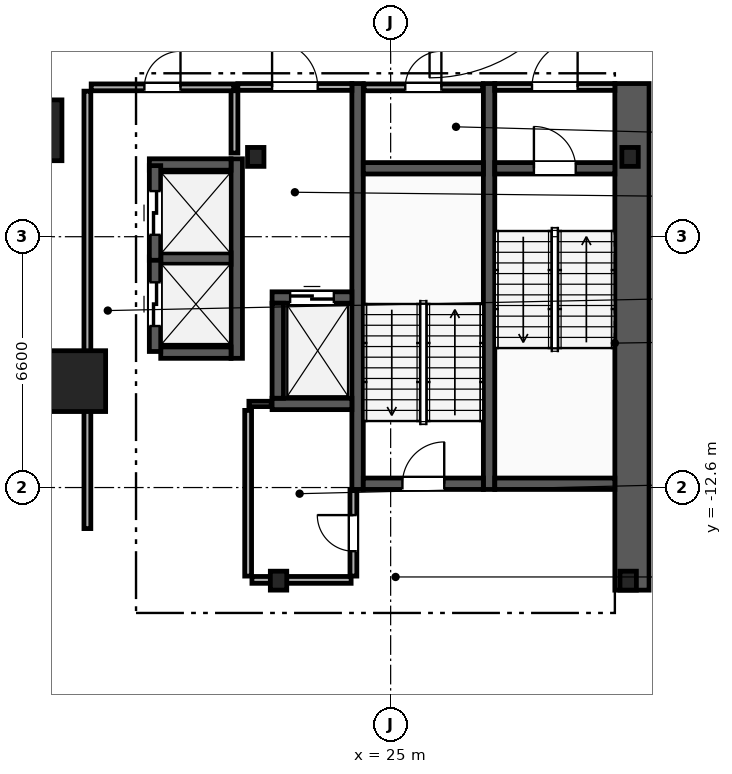
"""IFC4 building model, lengths in metres.
Left out: names, types, materials, properties, quantities, classifications, styles, units other than length and angle.
Written with IfcOpenShell. Run it as: python <this file> out.ifc"""

import sys

from ifc_helpers import new_model, si_unit, direction, frame, frame_2d, origin, origin_2d, place, context, subcontext, project, spatial, rectangle, i_section, extrude, element, fill, save


model = new_model("IFC4")
c1 = context("Model", 3, precision=1e-05, world=origin(), true_north=direction((0.0, 1.0)))
c2 = subcontext(c1, "Body", "Model", "MODEL_VIEW")
j1 = project(units=[si_unit("LENGTHUNIT", "METRE"), si_unit("PLANEANGLEUNIT", "RADIAN")], contexts=[c1])
p1 = place(None, origin())
s1 = spatial("IfcSite", under=j1, at=p1, CompositionType="ELEMENT")
p2 = place(p1, origin())
s2 = spatial("IfcBuilding", under=s1, at=p2, CompositionType="ELEMENT")
p3 = place(p2, frame((0.0, 0.0, -9.0)))
s3 = spatial("IfcBuildingStorey", under=s2, at=p3, CompositionType="ELEMENT", Elevation=-9.0)
for number, where, z_axis, x_axis in (
    (1, (31.3, -3.9, 0.0), (0.0, 0.0, 1.0), (1.0, 0.0, 0.0)),
    (2, (21.45, -3.9, 0.0), (0.0, 0.0, 1.0), (1.0, 0.0, 0.0)),
    (3, (22.05, -15.05, 0.0), (0.0, 0.0, 1.0), (1.0, 0.0, 0.0)),
    (4, (31.25, -15.05, 0.0), (0.0, 0.0, 1.0), (1.0, 0.0, 0.0)),
):
    element("IfcColumn", number, at=place(p3, frame(where, z_axis=z_axis, x_axis=x_axis)), inside=s3, PredefinedType="COLUMN", context=c2, shape_type="SweptSolid", body=[
        extrude(i_section(OverallWidth=0.432, OverallDepth=0.498, WebThickness=0.056, FlangeThickness=0.089, FilletRadius=0.018, at=origin_2d()), origin(), (0.0, 0.0, 1.0), 4.5),
    ])
for number, where, z_axis, x_axis in (
    (5, (15.55, -3.2, 0.0), (0.0, 0.0, 1.0), (1.0, 0.0, 0.0)),
    (6, (16.7, -9.8, 0.0), (0.0, 0.0, 1.0), (1.0, 0.0, 0.0)),
):
    element("IfcColumn", number, at=place(p3, frame(where, z_axis=z_axis, x_axis=x_axis)), inside=s3, PredefinedType="COLUMN", context=c2, shape_type="SweptSolid", body=[
        extrude(rectangle(XDim=1.6, YDim=1.6, at=origin_2d()), origin(), (0.0, 0.0, 1.0), 4.5),
    ])
p4 = place(p3, frame((31.35, -15.3, 0.0), z_axis=(0.0, 0.0, 1.0), x_axis=(0.0, 1.0, 0.0)))
e7 = element("IfcWall", 7, at=p4, inside=s3, PredefinedType="SHEAR", context=c2, shape_type="SweptSolid", body=[
    extrude(rectangle(XDim=13.33, YDim=0.9, at=frame_2d((6.665, 0.0))), origin(), (0.0, 0.0, 1.0), 4.15),
])
for number, where, z_axis, x_axis in (
    (8, (27.59, -12.65, 0.0), (0.0, 0.0, 1.0), (0.0, 1.0, 0.0)),
    (9, (24.13, -12.65, 0.0), (0.0, 0.0, 1.0), (0.0, 1.0, 0.0)),
):
    element("IfcWall", number, at=place(p3, frame(where, z_axis=z_axis, x_axis=x_axis)), inside=s3, PredefinedType="SHEAR", context=c2, shape_type="SweptSolid", body=[
        extrude(rectangle(XDim=10.68, YDim=0.3, at=frame_2d((5.34, 0.0))), origin(), (0.0, 0.0, 1.0), 4.15),
    ])
p5 = place(p3, frame((27.74, -4.2, 0.0), z_axis=(0.0, 0.0, 1.0), x_axis=(1.0, 0.0, 0.0)))
e10 = element("IfcWall", 10, at=p5, inside=s3, PredefinedType="SHEAR", context=c2, shape_type="SweptSolid", body=[
    extrude(rectangle(XDim=3.16, YDim=0.3, at=frame_2d((1.58, 0.0))), origin(), (0.0, 0.0, 1.0), 4.15),
])
p6 = place(p5, frame((1.03, 0.0, 0.0)))
e11 = element("IfcOpeningElement", 11, at=p6, cuts=e10, PredefinedType="OPENING", context=c2, shape_type="SweptSolid", body=[
    extrude(rectangle(XDim=1.1, YDim=2.15, at=frame_2d((0.55, 1.075))), frame((0.0, 0.16, 0.0), z_axis=(0.0, -1.0, 0.0), x_axis=(1.0, 0.0, 0.0)), (0.0, 0.0, 1.0), 0.32),
])
p7 = place(p3, frame((27.74, -12.5, 0.0), z_axis=(0.0, 0.0, 1.0), x_axis=(1.0, 0.0, 0.0)))
e12 = element("IfcWall", 12, at=p7, inside=s3, PredefinedType="SHEAR", context=c2, shape_type="SweptSolid", body=[
    extrude(rectangle(XDim=3.16, YDim=0.3, at=frame_2d((1.58, 0.0))), origin(), (0.0, 0.0, 1.0), 4.15),
])
p8 = place(p3, frame((24.28, -12.5, 0.0), z_axis=(0.0, 0.0, 1.0), x_axis=(1.0, 0.0, 0.0)))
e13 = element("IfcWall", 13, at=p8, inside=s3, PredefinedType="SHEAR", context=c2, shape_type="SweptSolid", body=[
    extrude(rectangle(XDim=3.16, YDim=0.3, at=frame_2d((1.58, 0.0))), origin(), (0.0, 0.0, 1.0), 4.15),
])
p9 = place(p8, frame((1.03, 0.0, 0.0)))
e14 = element("IfcOpeningElement", 14, at=p9, cuts=e13, PredefinedType="OPENING", context=c2, shape_type="SweptSolid", body=[
    extrude(rectangle(XDim=1.1, YDim=2.15, at=frame_2d((0.55, 1.075))), frame((0.0, 0.16, 0.0), z_axis=(0.0, -1.0, 0.0), x_axis=(1.0, 0.0, 0.0)), (0.0, 0.0, 1.0), 0.32),
])
p10 = place(p3, frame((24.28, -4.2, 0.0), z_axis=(0.0, 0.0, 1.0), x_axis=(1.0, 0.0, 0.0)))
e15 = element("IfcWall", 15, at=p10, inside=s3, PredefinedType="SHEAR", context=c2, shape_type="SweptSolid", body=[
    extrude(rectangle(XDim=3.16, YDim=0.3, at=frame_2d((1.58, 0.0))), origin(), (0.0, 0.0, 1.0), 4.15),
])
p11 = place(p3, frame((20.89, -3.8, 0.0), z_axis=(0.0, 0.0, 1.0), x_axis=(0.0, 1.0, 0.0)))
e16 = element("IfcWall", 16, at=p11, inside=s3, PredefinedType="PARTITIONING", context=c2, shape_type="SweptSolid", body=[
    extrude(rectangle(XDim=1.65, YDim=0.18, at=frame_2d((0.825, 0.0))), origin(), (0.0, 0.0, 1.0), 4.15),
])
p12 = place(p3, frame((20.98, -2.06, 0.0), z_axis=(0.0, 0.0, 1.0), x_axis=(1.0, 0.0, 0.0)))
e17 = element("IfcWall", 17, at=p12, inside=s3, PredefinedType="PARTITIONING", context=c2, shape_type="SweptSolid", body=[
    extrude(rectangle(XDim=3.0, YDim=0.18, at=frame_2d((1.5, 0.0))), origin(), (0.0, 0.0, 1.0), 4.15),
])
p13 = place(p12, frame((0.9, 0.0, 0.0)))
e18 = element("IfcOpeningElement", 18, at=p13, cuts=e17, PredefinedType="OPENING", context=c2, shape_type="SweptSolid", body=[
    extrude(rectangle(XDim=1.2, YDim=2.15, at=frame_2d((0.6, 1.075))), frame((0.0, 0.1, 0.0), z_axis=(0.0, -1.0, 0.0), x_axis=(1.0, 0.0, 0.0)), (0.0, 0.0, 1.0), 0.2),
])
p14 = place(p3, frame((27.74, -2.06, 0.0), z_axis=(0.0, 0.0, 1.0), x_axis=(1.0, 0.0, 0.0)))
e19 = element("IfcWall", 19, at=p14, inside=s3, PredefinedType="PARTITIONING", context=c2, shape_type="SweptSolid", body=[
    extrude(rectangle(XDim=3.16, YDim=0.18, at=frame_2d((1.58, 0.0))), origin(), (0.0, 0.0, 1.0), 4.15),
])
p15 = place(p14, frame((0.98, 0.0, 0.0)))
e20 = element("IfcOpeningElement", 20, at=p15, cuts=e19, PredefinedType="OPENING", context=c2, shape_type="SweptSolid", body=[
    extrude(rectangle(XDim=1.2, YDim=2.15, at=frame_2d((0.6, 1.075))), frame((0.0, 0.1, 0.0), z_axis=(0.0, -1.0, 0.0), x_axis=(1.0, 0.0, 0.0)), (0.0, 0.0, 1.0), 0.2),
])
p16 = place(p3, frame((21.88, -7.6, 0.0), z_axis=(0.0, 0.0, 1.0), x_axis=(1.0, 0.0, 0.0)))
e21 = element("IfcWall", 21, at=p16, inside=s3, PredefinedType="SHEAR", context=c2, shape_type="SweptSolid", body=[
    extrude(rectangle(XDim=2.1, YDim=0.3, at=frame_2d((1.05, 0.0))), origin(), (0.0, 0.0, 1.0), 4.15),
])
p17 = place(p16, frame((0.475, 0.0, 0.0)))
e22 = element("IfcOpeningElement", 22, at=p17, cuts=e21, PredefinedType="OPENING", context=c2, shape_type="SweptSolid", body=[
    extrude(rectangle(XDim=1.15, YDim=2.2, at=frame_2d((0.575, 1.1))), frame((0.0, 0.16, 0.0), z_axis=(0.0, -1.0, 0.0), x_axis=(1.0, 0.0, 0.0)), (0.0, 0.0, 1.0), 0.32),
])
p18 = place(p3, frame((21.88, -10.4, 0.0), z_axis=(0.0, 0.0, 1.0), x_axis=(1.0, 0.0, 0.0)))
e23 = element("IfcWall", 23, at=p18, inside=s3, PredefinedType="SHEAR", context=c2, shape_type="SweptSolid", body=[
    extrude(rectangle(XDim=2.1, YDim=0.3, at=frame_2d((1.05, 0.0))), origin(), (0.0, 0.0, 1.0), 4.15),
])
p19 = place(p3, frame((22.03, -10.25, 0.0), z_axis=(0.0, 0.0, 1.0), x_axis=(0.0, 1.0, 0.0)))
e24 = element("IfcWall", 24, at=p19, inside=s3, PredefinedType="SHEAR", context=c2, shape_type="SweptSolid", body=[
    extrude(rectangle(XDim=2.5, YDim=0.3, at=frame_2d((1.25, 0.0))), origin(), (0.0, 0.0, 1.0), 4.15),
])
p20 = place(p3, frame((20.95, -9.2, 0.0), z_axis=(0.0, 0.0, 1.0), x_axis=(0.0, 1.0, 0.0)))
e25 = element("IfcWall", 25, at=p20, inside=s3, PredefinedType="SHEAR", context=c2, shape_type="SweptSolid", body=[
    extrude(rectangle(XDim=5.25, YDim=0.3, at=frame_2d((2.625, 0.0))), origin(), (0.0, 0.0, 1.0), 4.15),
])
p21 = place(p3, frame((18.95, -9.05, 0.0), z_axis=(0.0, 0.0, 1.0), x_axis=(1.0, 0.0, 0.0)))
e26 = element("IfcWall", 26, at=p21, inside=s3, PredefinedType="SHEAR", context=c2, shape_type="SweptSolid", body=[
    extrude(rectangle(XDim=1.85, YDim=0.3, at=frame_2d((0.925, 0.0))), origin(), (0.0, 0.0, 1.0), 4.15),
])
p22 = place(p3, frame((18.65, -4.1, 0.0), z_axis=(0.0, 0.0, 1.0), x_axis=(1.0, 0.0, 0.0)))
e27 = element("IfcWall", 27, at=p22, inside=s3, PredefinedType="SHEAR", context=c2, shape_type="SweptSolid", body=[
    extrude(rectangle(XDim=2.15, YDim=0.3, at=frame_2d((1.075, 0.0))), origin(), (0.0, 0.0, 1.0), 4.15),
])
p23 = place(p3, frame((18.95, -6.575, 0.0), z_axis=(0.0, 0.0, 1.0), x_axis=(1.0, 0.0, 0.0)))
e28 = element("IfcWall", 28, at=p23, inside=s3, PredefinedType="SHEAR", context=c2, shape_type="SweptSolid", body=[
    extrude(rectangle(XDim=1.85, YDim=0.3, at=frame_2d((0.925, 0.0))), origin(), (0.0, 0.0, 1.0), 4.15),
])
p24 = place(p3, frame((18.8, -9.02, 0.0), z_axis=(0.0, 0.0, 1.0), x_axis=(0.0, 1.0, 0.0)))
e29 = element("IfcWall", 29, at=p24, inside=s3, PredefinedType="SHEAR", context=c2, shape_type="SweptSolid", body=[
    extrude(rectangle(XDim=2.49, YDim=0.3, at=frame_2d((1.245, 0.0))), origin(), (0.0, 0.0, 1.0), 4.15),
])
p25 = place(p24, frame((0.67, 0.0, 0.0)))
e30 = element("IfcOpeningElement", 30, at=p25, cuts=e29, PredefinedType="OPENING", context=c2, shape_type="SweptSolid", body=[
    extrude(rectangle(XDim=1.15, YDim=2.2, at=frame_2d((0.575, 1.1))), frame((0.0, 0.16, 0.0), z_axis=(0.0, -1.0, 0.0), x_axis=(1.0, 0.0, 0.0)), (0.0, 0.0, 1.0), 0.32),
])
p26 = place(p3, frame((18.8, -6.62, 0.0), z_axis=(0.0, 0.0, 1.0), x_axis=(0.0, 1.0, 0.0)))
e31 = element("IfcWall", 31, at=p26, inside=s3, PredefinedType="SHEAR", context=c2, shape_type="SweptSolid", body=[
    extrude(rectangle(XDim=2.49, YDim=0.3, at=frame_2d((1.245, 0.0))), origin(), (0.0, 0.0, 1.0), 4.15),
])
p27 = place(p26, frame((0.67, 0.0, 0.0)))
e32 = element("IfcOpeningElement", 32, at=p27, cuts=e31, PredefinedType="OPENING", context=c2, shape_type="SweptSolid", body=[
    extrude(rectangle(XDim=1.15, YDim=2.2, at=frame_2d((0.575, 1.1))), frame((0.0, 0.16, 0.0), z_axis=(0.0, -1.0, 0.0), x_axis=(1.0, 0.0, 0.0)), (0.0, 0.0, 1.0), 0.32),
])
p28 = place(p3, frame((17.02, -13.68, 0.0), z_axis=(0.0, 0.0, 1.0), x_axis=(0.0, 1.0, 0.0)))
e33 = element("IfcWall", 33, at=p28, inside=s3, PredefinedType="PARTITIONING", context=c2, shape_type="SweptSolid", body=[
    extrude(rectangle(XDim=11.51, YDim=0.18, at=frame_2d((5.755, 0.0))), origin(), (0.0, 0.0, 1.0), 4.15),
])
p29 = place(p3, frame((17.12, -2.07, 0.0), z_axis=(0.0, 0.0, 1.0), x_axis=(1.0, 0.0, 0.0)))
e34 = element("IfcWall", 34, at=p29, inside=s3, PredefinedType="PARTITIONING", context=c2, shape_type="SweptSolid", body=[
    extrude(rectangle(XDim=3.75, YDim=0.18, at=frame_2d((1.875, 0.0))), origin(), (0.0, 0.0, 1.0), 4.15),
])
p30 = place(p29, frame((1.4, 0.0, 0.0)))
e35 = element("IfcOpeningElement", 35, at=p30, cuts=e34, PredefinedType="OPENING", context=c2, shape_type="SweptSolid", body=[
    extrude(rectangle(XDim=0.95, YDim=2.1, at=frame_2d((0.475, 1.05))), frame((0.0, 0.1, 0.0), z_axis=(0.0, -1.0, 0.0), x_axis=(1.0, 0.0, 0.0)), (0.0, 0.0, 1.0), 0.2),
])
p31 = place(p3, frame((21.27, -10.4, 0.0), z_axis=(0.0, 0.0, 1.0), x_axis=(1.0, 0.0, 0.0)))
e36 = element("IfcWall", 36, at=p31, inside=s3, PredefinedType="PARTITIONING", context=c2, shape_type="SweptSolid", body=[
    extrude(rectangle(XDim=0.59, YDim=0.14, at=frame_2d((0.295, 0.0))), origin(), (0.0, 0.0, 1.0), 4.15),
])
p32 = place(p3, frame((21.25, -14.93, 0.0), z_axis=(0.0, 0.0, 1.0), x_axis=(0.0, 1.0, 0.0)))
e37 = element("IfcWall", 37, at=p32, inside=s3, PredefinedType="PARTITIONING", context=c2, shape_type="SweptSolid", body=[
    extrude(rectangle(XDim=4.36, YDim=0.18, at=frame_2d((2.18, 0.0))), origin(), (0.0, 0.0, 1.0), 4.15),
])
p33 = place(p3, frame((21.35, -15.03, 0.0), z_axis=(0.0, 0.0, 1.0), x_axis=(1.0, 0.0, 0.0)))
e38 = element("IfcWall", 38, at=p33, inside=s3, PredefinedType="PARTITIONING", context=c2, shape_type="SweptSolid", body=[
    extrude(rectangle(XDim=2.61, YDim=0.18, at=frame_2d((1.305, 0.0))), origin(), (0.0, 0.0, 1.0), 3.223),
])
p34 = place(p3, frame((24.3, -2.07, 0.0), z_axis=(0.0, 0.0, 1.0), x_axis=(1.0, 0.0, 0.0)))
e39 = element("IfcWall", 39, at=p34, inside=s3, PredefinedType="PARTITIONING", context=c2, shape_type="SweptSolid", body=[
    extrude(rectangle(XDim=3.12, YDim=0.18, at=frame_2d((1.56, 0.0))), origin(), (0.0, 0.0, 1.0), 4.15),
])
p35 = place(p34, frame((1.085, 0.0, 0.0)))
e40 = element("IfcOpeningElement", 40, at=p35, cuts=e39, PredefinedType="OPENING", context=c2, shape_type="SweptSolid", body=[
    extrude(rectangle(XDim=0.95, YDim=2.1, at=frame_2d((0.475, 1.05))), frame((0.0, 0.1, 0.0), z_axis=(0.0, -1.0, 0.0), x_axis=(1.0, 0.0, 0.0)), (0.0, 0.0, 1.0), 0.2),
])
p36 = place(p3, frame((24.02, -14.93, 0.0), z_axis=(0.0, 0.0, 1.0), x_axis=(0.0, 1.0, 0.0)))
e41 = element("IfcWall", 41, at=p36, inside=s3, PredefinedType="PARTITIONING", context=c2, shape_type="SweptSolid", body=[
    extrude(rectangle(XDim=2.26, YDim=0.18, at=frame_2d((1.13, 0.0))), origin(), (0.0, 0.0, 1.0), 4.15),
])
p37 = place(p36, frame((0.655, 0.0, 0.0)))
e42 = element("IfcOpeningElement", 42, at=p37, cuts=e41, PredefinedType="OPENING", context=c2, shape_type="SweptSolid", body=[
    extrude(rectangle(XDim=0.95, YDim=2.1, at=frame_2d((0.475, 1.05))), frame((0.0, 0.1, 0.0), z_axis=(0.0, -1.0, 0.0), x_axis=(1.0, 0.0, 0.0)), (0.0, 0.0, 1.0), 0.2),
])
p38 = place(p6, origin())
e43 = element("IfcDoor", 43, at=p38, inside=s3, OperationType="SINGLE_SWING_LEFT", PredefinedType="DOOR", context=c2, shape_type="SweptSolid", body=[
    extrude(rectangle(XDim=1.1, YDim=2.15, at=frame_2d((0.55, 1.075))), frame((0.0, 0.025, 0.0), z_axis=(0.0, -1.0, 0.0), x_axis=(1.0, 0.0, 0.0)), (0.0, 0.0, 1.0), 0.05),
])
fill(e11, e43)
p39 = place(p9, origin())
e44 = element("IfcDoor", 44, at=p39, inside=s3, OperationType="SINGLE_SWING_RIGHT", PredefinedType="DOOR", context=c2, shape_type="SweptSolid", body=[
    extrude(rectangle(XDim=1.1, YDim=2.15, at=frame_2d((0.55, 1.075))), frame((0.0, 0.025, 0.0), z_axis=(0.0, -1.0, 0.0), x_axis=(1.0, 0.0, 0.0)), (0.0, 0.0, 1.0), 0.05),
])
fill(e14, e44)
p40 = place(p13, origin())
e45 = element("IfcDoor", 45, at=p40, inside=s3, OperationType="SINGLE_SWING_LEFT", PredefinedType="DOOR", context=c2, shape_type="SweptSolid", body=[
    extrude(rectangle(XDim=1.2, YDim=2.15, at=frame_2d((0.6, 1.075))), frame((0.0, 0.025, 0.0), z_axis=(0.0, -1.0, 0.0), x_axis=(1.0, 0.0, 0.0)), (0.0, 0.0, 1.0), 0.05),
])
fill(e18, e45)
p41 = place(p15, origin())
e46 = element("IfcDoor", 46, at=p41, inside=s3, OperationType="SINGLE_SWING_RIGHT", PredefinedType="DOOR", context=c2, shape_type="SweptSolid", body=[
    extrude(rectangle(XDim=1.2, YDim=2.15, at=frame_2d((0.6, 1.075))), frame((0.0, 0.025, 0.0), z_axis=(0.0, -1.0, 0.0), x_axis=(1.0, 0.0, 0.0)), (0.0, 0.0, 1.0), 0.05),
])
fill(e20, e46)
p42 = place(p17, origin())
e47 = element("IfcDoor", 47, at=p42, inside=s3, OperationType="SLIDING_TO_LEFT", PredefinedType="TRAPDOOR", context=c2, shape_type="SweptSolid", body=[
    extrude(rectangle(XDim=1.15, YDim=2.2, at=frame_2d((0.575, 1.1))), frame((0.0, 0.025, 0.0), z_axis=(0.0, -1.0, 0.0), x_axis=(1.0, 0.0, 0.0)), (0.0, 0.0, 1.0), 0.05),
])
fill(e22, e47)
p43 = place(p25, origin())
e48 = element("IfcDoor", 48, at=p43, inside=s3, OperationType="SLIDING_TO_LEFT", PredefinedType="TRAPDOOR", context=c2, shape_type="SweptSolid", body=[
    extrude(rectangle(XDim=1.15, YDim=2.2, at=frame_2d((0.575, 1.1))), frame((0.0, 0.025, 0.0), z_axis=(0.0, -1.0, 0.0), x_axis=(1.0, 0.0, 0.0)), (0.0, 0.0, 1.0), 0.05),
])
fill(e30, e48)
p44 = place(p27, origin())
e49 = element("IfcDoor", 49, at=p44, inside=s3, OperationType="SLIDING_TO_LEFT", PredefinedType="TRAPDOOR", context=c2, shape_type="SweptSolid", body=[
    extrude(rectangle(XDim=1.15, YDim=2.2, at=frame_2d((0.575, 1.1))), frame((0.0, 0.025, 0.0), z_axis=(0.0, -1.0, 0.0), x_axis=(1.0, 0.0, 0.0)), (0.0, 0.0, 1.0), 0.05),
])
fill(e32, e49)
p45 = place(p30, origin())
e50 = element("IfcDoor", 50, at=p45, inside=s3, OperationType="SINGLE_SWING_RIGHT", PredefinedType="DOOR", context=c2, shape_type="SweptSolid", body=[
    extrude(rectangle(XDim=0.95, YDim=2.1, at=frame_2d((0.475, 1.05))), frame((0.0, 0.025, 0.0), z_axis=(0.0, -1.0, 0.0), x_axis=(1.0, 0.0, 0.0)), (0.0, 0.0, 1.0), 0.05),
])
fill(e35, e50)
p46 = place(p35, origin())
e51 = element("IfcDoor", 51, at=p46, inside=s3, OperationType="SINGLE_SWING_RIGHT", PredefinedType="DOOR", context=c2, shape_type="SweptSolid", body=[
    extrude(rectangle(XDim=0.95, YDim=2.1, at=frame_2d((0.475, 1.05))), frame((0.0, 0.025, 0.0), z_axis=(0.0, -1.0, 0.0), x_axis=(1.0, 0.0, 0.0)), (0.0, 0.0, 1.0), 0.05),
])
fill(e40, e51)
p47 = place(p37, origin())
e52 = element("IfcDoor", 52, at=p47, inside=s3, OperationType="SINGLE_SWING_RIGHT", PredefinedType="DOOR", context=c2, shape_type="SweptSolid", body=[
    extrude(rectangle(XDim=0.95, YDim=2.1, at=frame_2d((0.475, 1.05))), frame((0.0, 0.025, 0.0), z_axis=(0.0, -1.0, 0.0), x_axis=(1.0, 0.0, 0.0)), (0.0, 0.0, 1.0), 0.05),
])
fill(e42, e52)
save(model, sys.argv[1])
